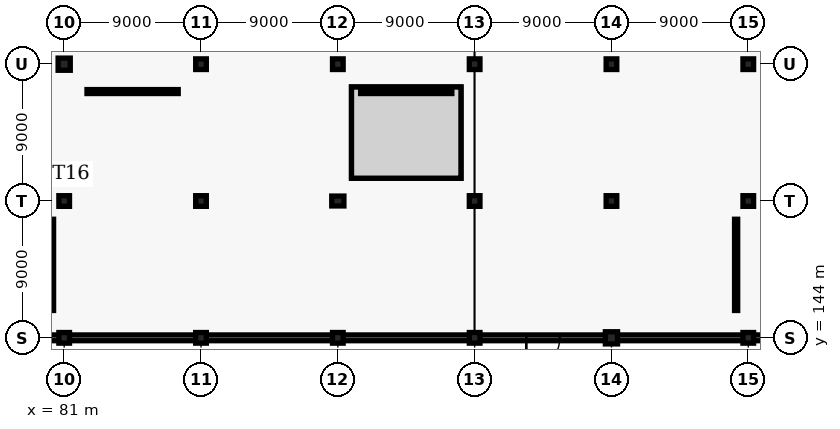
"""IFC4 building model, lengths in metres.
Left out: names, types, materials, properties, quantities, classifications, styles, units other than length and angle.
Written with IfcOpenShell. Run it as: python <this file> out.ifc"""

import sys

from ifc_helpers import new_model, si_unit, direction, frame, frame_2d, origin, origin_2d, place, context, subcontext, project, spatial, rectangle, circle, extrude, element, fill, save


model = new_model("IFC4")
c1 = context("Model", 3, precision=1e-05, world=origin(), true_north=direction((0.0, 1.0)))
c2 = subcontext(c1, "Body", "Model", "MODEL_VIEW")
j1 = project(units=[si_unit("LENGTHUNIT", "METRE"), si_unit("PLANEANGLEUNIT", "RADIAN")], contexts=[c1])
p1 = place(None, origin())
s1 = spatial("IfcSite", under=j1, at=p1, CompositionType="ELEMENT")
p2 = place(p1, origin())
s2 = spatial("IfcBuilding", under=s1, at=p2, CompositionType="ELEMENT")
p3 = place(p2, origin())
s3 = spatial("IfcBuildingStorey", under=s2, at=p3, CompositionType="ELEMENT", Elevation=0.0)
for number, where, z_axis, x_axis in (
    (1, (81.0, 144.0, 0.0), (0.0, 0.0, 1.0), (1.0, 0.0, 0.0)),
    (2, (81.0, 153.0, 0.0), (0.0, 0.0, 1.0), (1.0, 0.0, 0.0)),
):
    element("IfcColumn", number, at=place(p3, frame(where, z_axis=z_axis, x_axis=x_axis)), inside=s3, PredefinedType="COLUMN", context=c2, shape_type="SweptSolid", body=[
        extrude(rectangle(XDim=0.7, YDim=0.7, at=origin_2d()), origin(), (0.0, 0.0, 1.0), 5.4),
    ])
p4 = place(p3, frame((81.0, 162.0, 0.0), z_axis=(0.0, 0.0, 1.0), x_axis=(1.0, 0.0, 0.0)))
e3 = element("IfcColumn", 3, at=p4, inside=s3, PredefinedType="COLUMN", context=c2, shape_type="SweptSolid", body=[
    extrude(circle(Radius=0.4, at=origin_2d()), origin(), (0.0, 0.0, 1.0), 5.4),
])
for number, where, z_axis, x_axis in (
    (4, (90.0, 144.0, 0.0), (0.0, 0.0, 1.0), (1.0, 0.0, 0.0)),
    (5, (90.0, 153.0, 0.0), (0.0, 0.0, 1.0), (1.0, 0.0, 0.0)),
    (6, (90.0, 162.0, 0.0), (0.0, 0.0, 1.0), (1.0, 0.0, 0.0)),
    (7, (99.0, 144.0, 0.0), (0.0, 0.0, 1.0), (1.0, 0.0, 0.0)),
):
    element("IfcColumn", number, at=place(p3, frame(where, z_axis=z_axis, x_axis=x_axis)), inside=s3, PredefinedType="COLUMN", context=c2, shape_type="SweptSolid", body=[
        extrude(rectangle(XDim=0.7, YDim=0.7, at=origin_2d()), origin(), (0.0, 0.0, 1.0), 5.4),
    ])
p5 = place(p3, frame((99.0, 153.0, 0.0), z_axis=(0.0, 0.0, 1.0), x_axis=(1.0, 0.0, 0.0)))
e8 = element("IfcColumn", 8, at=p5, inside=s3, PredefinedType="COLUMN", context=c2, shape_type="SweptSolid", body=[
    extrude(rectangle(XDim=0.8, YDim=0.65, at=origin_2d()), origin(), (0.0, 0.0, 1.0), 5.4),
])
for number, where, z_axis, x_axis in (
    (9, (99.0, 162.0, 0.0), (0.0, 0.0, 1.0), (1.0, 0.0, 0.0)),
    (10, (108.0, 144.0, 0.0), (0.0, 0.0, 1.0), (1.0, 0.0, 0.0)),
    (11, (108.0, 153.0, 0.0), (0.0, 0.0, 1.0), (1.0, 0.0, 0.0)),
    (12, (108.0, 162.0, 0.0), (0.0, 0.0, 1.0), (1.0, 0.0, 0.0)),
):
    element("IfcColumn", number, at=place(p3, frame(where, z_axis=z_axis, x_axis=x_axis)), inside=s3, PredefinedType="COLUMN", context=c2, shape_type="SweptSolid", body=[
        extrude(rectangle(XDim=0.7, YDim=0.7, at=origin_2d()), origin(), (0.0, 0.0, 1.0), 5.4),
    ])
p6 = place(p3, frame((117.0, 144.0, 0.0), z_axis=(0.0, 0.0, 1.0), x_axis=(1.0, 0.0, 0.0)))
e13 = element("IfcColumn", 13, at=p6, inside=s3, PredefinedType="COLUMN", context=c2, shape_type="SweptSolid", body=[
    extrude(circle(Radius=0.4, at=origin_2d()), origin(), (0.0, 0.0, 1.0), 5.4),
])
for number, where, z_axis, x_axis in (
    (14, (117.0, 153.0, 0.0), (0.0, 0.0, 1.0), (1.0, 0.0, 0.0)),
    (15, (117.0, 162.0, 0.0), (0.0, 0.0, 1.0), (1.0, 0.0, 0.0)),
    (16, (126.0, 144.0, 0.0), (0.0, 0.0, 1.0), (1.0, 0.0, 0.0)),
    (17, (126.0, 153.0, 0.0), (0.0, 0.0, 1.0), (1.0, 0.0, 0.0)),
    (18, (126.0, 162.0, 0.0), (0.0, 0.0, 1.0), (1.0, 0.0, 0.0)),
):
    element("IfcColumn", number, at=place(p3, frame(where, z_axis=z_axis, x_axis=x_axis)), inside=s3, PredefinedType="COLUMN", context=c2, shape_type="SweptSolid", body=[
        extrude(rectangle(XDim=0.7, YDim=0.7, at=origin_2d()), origin(), (0.0, 0.0, 1.0), 5.4),
    ])
for number, where, z_axis, x_axis in (
    (19, (72.06, 144.0, 0.0), (0.0, 0.0, 1.0), (1.0, 0.0, 0.0)),
    (20, (81.06, 144.0, 0.0), (0.0, 0.0, 1.0), (1.0, 0.0, 0.0)),
    (21, (90.06, 144.0, 0.0), (0.0, 0.0, 1.0), (1.0, 0.0, 0.0)),
    (22, (99.06, 144.0, 0.0), (0.0, 0.0, 1.0), (1.0, 0.0, 0.0)),
):
    element("IfcWall", number, at=place(p3, frame(where, z_axis=z_axis, x_axis=x_axis)), inside=s3, PredefinedType="SOLIDWALL", context=c2, shape_type="SweptSolid", body=[
        extrude(rectangle(XDim=8.88, YDim=0.38, at=frame_2d((4.44, 0.0))), origin(), (0.0, 0.0, 1.0), 4.55),
    ])
p7 = place(p3, frame((108.06, 144.0, 0.0), z_axis=(0.0, 0.0, 1.0), x_axis=(1.0, 0.0, 0.0)))
e23 = element("IfcWall", 23, at=p7, inside=s3, PredefinedType="SOLIDWALL", context=c2, shape_type="SweptSolid", body=[
    extrude(rectangle(XDim=8.88, YDim=0.38, at=frame_2d((4.44, 0.0))), origin(), (0.0, 0.0, 1.0), 4.55),
])
p8 = place(p7, frame((3.34, 0.0, 0.0)))
e24 = element("IfcOpeningElement", 24, at=p8, cuts=e23, PredefinedType="OPENING", context=c2, shape_type="SweptSolid", body=[
    extrude(rectangle(XDim=2.2, YDim=2.4, at=frame_2d((1.1, 1.2))), frame((0.0, 0.2, 0.0), z_axis=(0.0, -1.0, 0.0), x_axis=(1.0, 0.0, 0.0)), (0.0, 0.0, 1.0), 0.4),
])
for number, where, z_axis, x_axis in (
    (25, (117.06, 144.0, 0.0), (0.0, 0.0, 1.0), (1.0, 0.0, 0.0)),
    (26, (126.06, 144.0, 0.0), (0.0, 0.0, 1.0), (1.0, 0.0, 0.0)),
):
    element("IfcWall", number, at=place(p3, frame(where, z_axis=z_axis, x_axis=x_axis)), inside=s3, PredefinedType="SOLIDWALL", context=c2, shape_type="SweptSolid", body=[
        extrude(rectangle(XDim=8.88, YDim=0.38, at=frame_2d((4.44, 0.0))), origin(), (0.0, 0.0, 1.0), 4.55),
    ])
p9 = place(p3, frame((82.5, 160.2, 0.0), z_axis=(0.0, 0.0, 1.0), x_axis=(1.0, 0.0, 0.0)))
e27 = element("IfcWall", 27, at=p9, inside=s3, PredefinedType="PARTITIONING", context=c2, shape_type="SweptSolid", body=[
    extrude(rectangle(XDim=6.0, YDim=0.26, at=frame_2d((3.0, 0.0))), origin(), (0.0, 0.0, 1.0), 4.3),
])
p10 = place(p9, frame((2.1, 0.0, 0.0)))
e28 = element("IfcOpeningElement", 28, at=p10, cuts=e27, PredefinedType="OPENING", context=c2, shape_type="SweptSolid", body=[
    extrude(rectangle(XDim=1.8, YDim=2.4, at=frame_2d((0.9, 1.2))), frame((0.0, 0.14, 0.0), z_axis=(0.0, -1.0, 0.0), x_axis=(1.0, 0.0, 0.0)), (0.0, 0.0, 1.0), 0.28),
])
p11 = place(p3, frame((100.5, 160.2, 0.0), z_axis=(0.0, 0.0, 1.0), x_axis=(1.0, 0.0, 0.0)))
e29 = element("IfcWall", 29, at=p11, inside=s3, PredefinedType="PARTITIONING", context=c2, shape_type="SweptSolid", body=[
    extrude(rectangle(XDim=6.0, YDim=0.26, at=frame_2d((3.0, 0.0))), origin(), (0.0, 0.0, 1.0), 4.3),
])
p12 = place(p11, frame((2.025, 0.0, 0.0)))
e30 = element("IfcOpeningElement", 30, at=p12, cuts=e29, PredefinedType="OPENING", context=c2, shape_type="SweptSolid", body=[
    extrude(rectangle(XDim=1.95, YDim=2.5, at=frame_2d((0.975, 1.25))), frame((0.0, 0.14, 0.0), z_axis=(0.0, -1.0, 0.0), x_axis=(1.0, 0.0, 0.0)), (0.0, 0.0, 1.0), 0.28),
])
p13 = place(p3, frame((80.2, 145.8, 0.0), z_axis=(0.0, 0.0, 1.0), x_axis=(0.0, 1.0, 0.0)))
e31 = element("IfcWall", 31, at=p13, inside=s3, PredefinedType="PARTITIONING", context=c2, shape_type="SweptSolid", body=[
    extrude(rectangle(XDim=6.0, YDim=0.205, at=frame_2d((3.0, 0.0))), origin(), (0.0, 0.0, 1.0), 4.3),
])
p14 = place(p13, frame((2.1, 0.0, 0.0)))
e32 = element("IfcOpeningElement", 32, at=p14, cuts=e31, PredefinedType="OPENING", context=c2, shape_type="SweptSolid", body=[
    extrude(rectangle(XDim=1.8, YDim=2.4, at=frame_2d((0.9, 1.2))), frame((0.0, 0.113, 0.0), z_axis=(0.0, -1.0, 0.0), x_axis=(1.0, 0.0, 0.0)), (0.0, 0.0, 1.0), 0.225),
])
p15 = place(p3, frame((125.2, 145.8, 0.0), z_axis=(0.0, 0.0, 1.0), x_axis=(0.0, 1.0, 0.0)))
e33 = element("IfcWall", 33, at=p15, inside=s3, PredefinedType="PARTITIONING", context=c2, shape_type="SweptSolid", body=[
    extrude(rectangle(XDim=6.0, YDim=0.205, at=frame_2d((3.0, 0.0))), origin(), (0.0, 0.0, 1.0), 4.3),
])
p16 = place(p15, frame((2.1, 0.0, 0.0)))
e34 = element("IfcOpeningElement", 34, at=p16, cuts=e33, PredefinedType="OPENING", context=c2, shape_type="SweptSolid", body=[
    extrude(rectangle(XDim=1.8, YDim=2.4, at=frame_2d((0.9, 1.2))), frame((0.0, 0.113, 0.0), z_axis=(0.0, -1.0, 0.0), x_axis=(1.0, 0.0, 0.0)), (0.0, 0.0, 1.0), 0.225),
])
p17 = place(p8, frame((2.2, 0.0, 0.0), z_axis=(0.0, 0.0, 1.0), x_axis=(-1.0, 0.0, 0.0)))
e35 = element("IfcDoor", 35, at=p17, inside=s3, OperationType="DOUBLE_DOOR_SINGLE_SWING", PredefinedType="DOOR", context=c2, shape_type="SweptSolid", body=[
    extrude(rectangle(XDim=2.2, YDim=2.4, at=frame_2d((1.1, 1.2))), frame((0.0, 0.025, 0.0), z_axis=(0.0, -1.0, 0.0), x_axis=(1.0, 0.0, 0.0)), (0.0, 0.0, 1.0), 0.05),
])
fill(e24, e35)
p18 = place(p10, origin())
e36 = element("IfcDoor", 36, at=p18, inside=s3, OperationType="SLIDING_TO_LEFT", PredefinedType="DOOR", context=c2, shape_type="SweptSolid", body=[
    extrude(rectangle(XDim=1.8, YDim=2.4, at=frame_2d((0.9, 1.2))), frame((0.0, 0.025, 0.0), z_axis=(0.0, -1.0, 0.0), x_axis=(1.0, 0.0, 0.0)), (0.0, 0.0, 1.0), 0.05),
])
fill(e28, e36)
p19 = place(p12, origin())
e37 = element("IfcDoor", 37, at=p19, inside=s3, OperationType="SLIDING_TO_RIGHT", PredefinedType="DOOR", context=c2, shape_type="SweptSolid", body=[
    extrude(rectangle(XDim=1.95, YDim=2.5, at=frame_2d((0.975, 1.25))), frame((0.0, 0.025, 0.0), z_axis=(0.0, -1.0, 0.0), x_axis=(1.0, 0.0, 0.0)), (0.0, 0.0, 1.0), 0.05),
])
fill(e30, e37)
p20 = place(p14, origin())
e38 = element("IfcDoor", 38, at=p20, inside=s3, OperationType="SLIDING_TO_RIGHT", PredefinedType="DOOR", context=c2, shape_type="SweptSolid", body=[
    extrude(rectangle(XDim=1.8, YDim=2.4, at=frame_2d((0.9, 1.2))), frame((0.0, 0.025, 0.0), z_axis=(0.0, -1.0, 0.0), x_axis=(1.0, 0.0, 0.0)), (0.0, 0.0, 1.0), 0.05),
])
fill(e32, e38)
p21 = place(p16, origin())
e39 = element("IfcDoor", 39, at=p21, inside=s3, OperationType="SLIDING_TO_LEFT", PredefinedType="DOOR", context=c2, shape_type="SweptSolid", body=[
    extrude(rectangle(XDim=1.8, YDim=2.4, at=frame_2d((0.9, 1.2))), frame((0.0, 0.025, 0.0), z_axis=(0.0, -1.0, 0.0), x_axis=(1.0, 0.0, 0.0)), (0.0, 0.0, 1.0), 0.05),
])
fill(e34, e39)
save(model, sys.argv[1])
